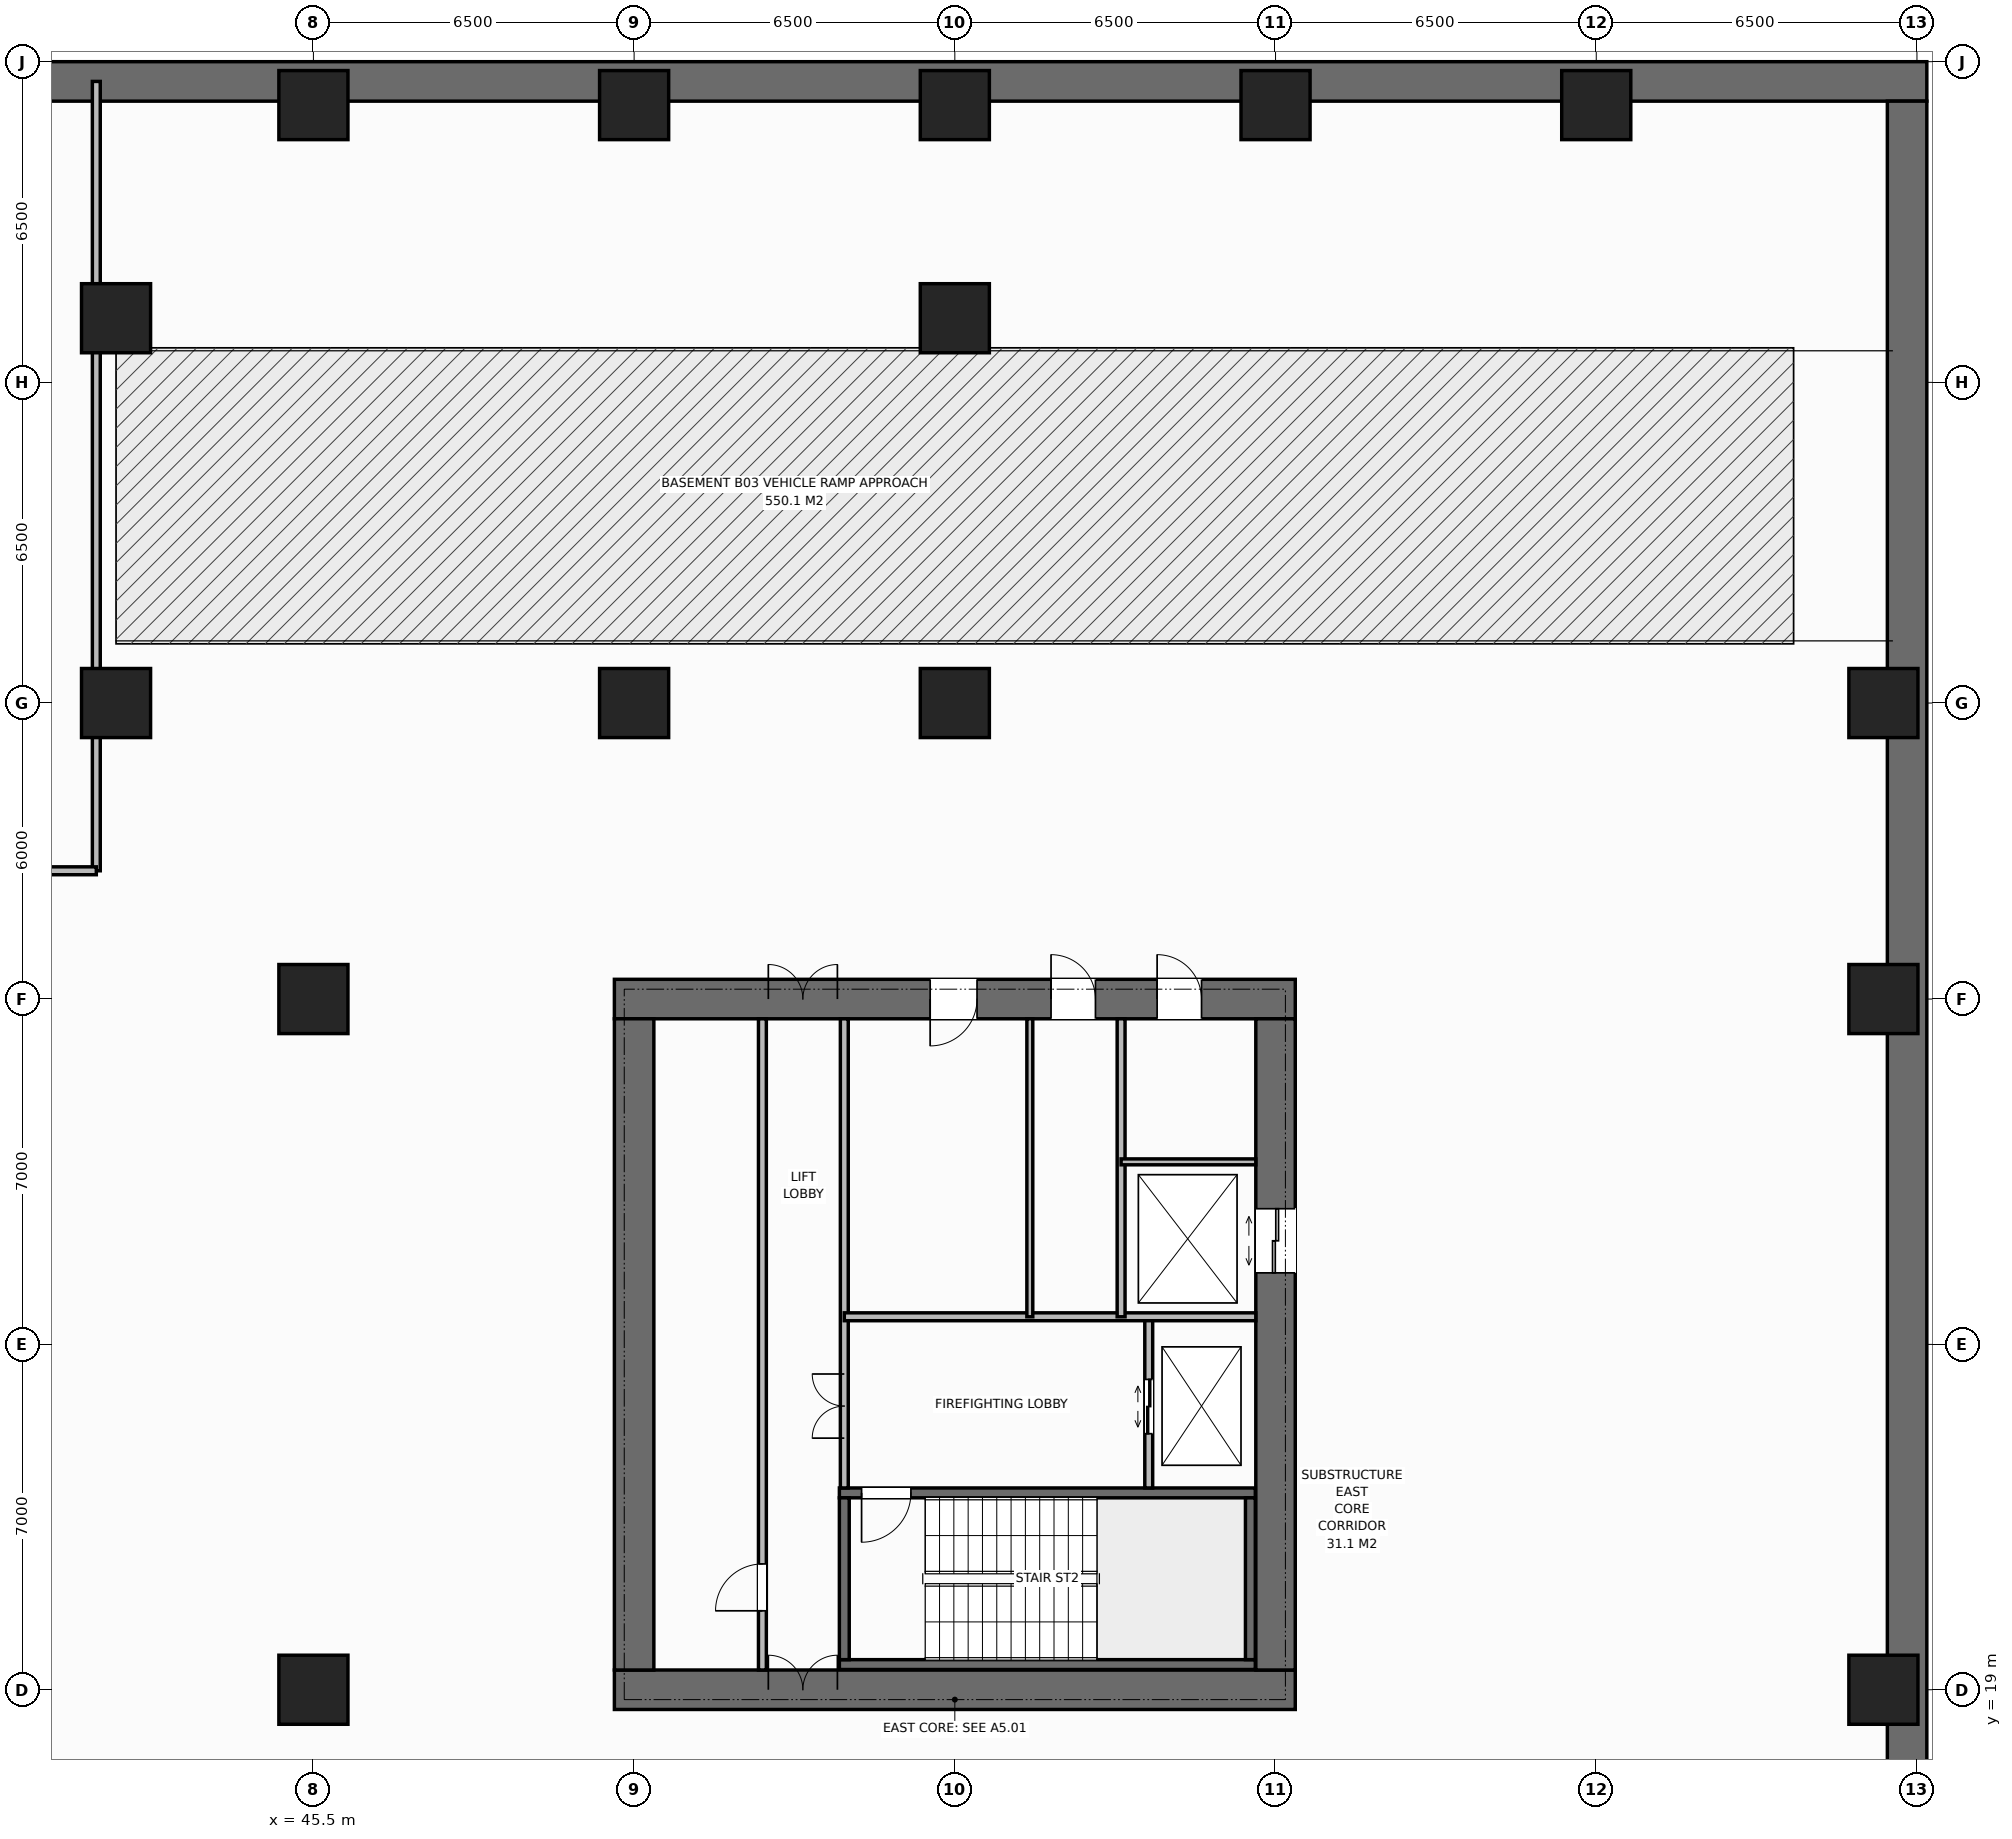
"""IFC4 building model, lengths in metres.
Left out: names, types, materials, properties, quantities, classifications, styles, units other than length and angle.
Written with IfcOpenShell. Run it as: python <this file> out.ifc"""

import sys

from ifc_helpers import new_model, si_unit, direction, frame, frame_2d, origin, origin_2d, place, context, subcontext, project, spatial, rectangle, extrude, element, fill, save


model = new_model("IFC4")
c1 = context("Model", 3, precision=1e-05, world=origin(), true_north=direction((0.0, 1.0)))
c2 = subcontext(c1, "Body", "Model", "MODEL_VIEW")
j1 = project(units=[si_unit("LENGTHUNIT", "METRE"), si_unit("PLANEANGLEUNIT", "RADIAN")], contexts=[c1])
p1 = place(None, origin())
s1 = spatial("IfcSite", under=j1, at=p1, CompositionType="ELEMENT")
p2 = place(p1, origin())
s2 = spatial("IfcBuilding", under=s1, at=p2, CompositionType="ELEMENT")
p3 = place(p2, frame((0.0, 0.0, -13.5)))
s3 = spatial("IfcBuildingStorey", under=s2, at=p3, CompositionType="ELEMENT", Elevation=-13.5)
p4 = place(p3, frame((78.2, 51.6, 0.0), z_axis=(0.0, 0.0, 1.0), x_axis=(-1.0, 0.0, 0.0)))
e1 = element("IfcWall", 1, at=p4, inside=s3, PredefinedType="USERDEFINED", context=c2, shape_type="SweptSolid", body=[
    extrude(rectangle(XDim=78.4, YDim=0.8, at=frame_2d((39.2, 0.0))), origin(), (0.0, 0.0, 1.0), 4.2),
])
p5 = place(p3, frame((77.8, 0.8, 0.0), z_axis=(0.0, 0.0, 1.0), x_axis=(0.0, 1.0, 0.0)))
e2 = element("IfcWall", 2, at=p5, inside=s3, PredefinedType="USERDEFINED", context=c2, shape_type="SweptSolid", body=[
    extrude(rectangle(XDim=50.4, YDim=0.8, at=frame_2d((25.2, 0.0))), origin(), (0.0, 0.0, 1.0), 4.2),
])
p6 = place(p3, frame((51.6, 19.0, 0.0), z_axis=(0.0, 0.0, 1.0), x_axis=(1.0, 0.0, 0.0)))
e3 = element("IfcWall", 3, at=p6, inside=s3, PredefinedType="SHEAR", context=c2, shape_type="SweptSolid", body=[
    extrude(rectangle(XDim=13.8, YDim=0.8, at=frame_2d((6.9, 0.0))), origin(), (0.0, 0.0, 1.0), 4.5),
])
p7 = place(p6, frame((3.12, 0.0, 0.0)))
e4 = element("IfcOpeningElement", 4, at=p7, cuts=e3, PredefinedType="OPENING", context=c2, shape_type="SweptSolid", body=[
    extrude(rectangle(XDim=1.4, YDim=2.2, at=frame_2d((0.7, 1.1))), frame((0.0, 0.41, 0.0), z_axis=(0.0, -1.0, 0.0), x_axis=(1.0, 0.0, 0.0)), (0.0, 0.0, 1.0), 0.82),
])
p8 = place(p3, frame((51.6, 33.0, 0.0), z_axis=(0.0, 0.0, 1.0), x_axis=(1.0, 0.0, 0.0)))
e5 = element("IfcWall", 5, at=p8, inside=s3, PredefinedType="SHEAR", context=c2, shape_type="SweptSolid", body=[
    extrude(rectangle(XDim=13.8, YDim=0.8, at=frame_2d((6.9, 0.0))), origin(), (0.0, 0.0, 1.0), 4.5),
])
p9 = place(p8, frame((3.12, 0.0, 0.0)))
e6 = element("IfcOpeningElement", 6, at=p9, cuts=e5, PredefinedType="OPENING", context=c2, shape_type="SweptSolid", body=[
    extrude(rectangle(XDim=1.4, YDim=2.2, at=frame_2d((0.7, 1.1))), frame((0.0, 0.41, 0.0), z_axis=(0.0, -1.0, 0.0), x_axis=(1.0, 0.0, 0.0)), (0.0, 0.0, 1.0), 0.82),
])
p10 = place(p8, frame((11.0, 0.0, 0.0)))
e7 = element("IfcOpeningElement", 7, at=p10, cuts=e5, PredefinedType="OPENING", context=c2, shape_type="SweptSolid", body=[
    extrude(rectangle(XDim=0.9, YDim=2.15, at=frame_2d((0.45, 1.075))), frame((0.0, 0.41, 0.0), z_axis=(0.0, -1.0, 0.0), x_axis=(1.0, 0.0, 0.0)), (0.0, 0.0, 1.0), 0.82),
])
p11 = place(p8, frame((6.4, 0.0, 0.0)))
e8 = element("IfcOpeningElement", 8, at=p11, cuts=e5, PredefinedType="OPENING", context=c2, shape_type="SweptSolid", body=[
    extrude(rectangle(XDim=0.95, YDim=2.15, at=frame_2d((0.475, 1.075))), frame((0.0, 0.41, 0.0), z_axis=(0.0, -1.0, 0.0), x_axis=(1.0, 0.0, 0.0)), (0.0, 0.0, 1.0), 0.82),
])
p12 = place(p8, frame((8.85, 0.0, 0.0)))
e9 = element("IfcOpeningElement", 9, at=p12, cuts=e5, PredefinedType="OPENING", context=c2, shape_type="SweptSolid", body=[
    extrude(rectangle(XDim=0.9, YDim=2.15, at=frame_2d((0.45, 1.075))), frame((0.0, 0.41, 0.0), z_axis=(0.0, -1.0, 0.0), x_axis=(1.0, 0.0, 0.0)), (0.0, 0.0, 1.0), 0.82),
])
p13 = place(p3, frame((52.0, 19.4, 0.0), z_axis=(0.0, 0.0, 1.0), x_axis=(0.0, 1.0, 0.0)))
e10 = element("IfcWall", 10, at=p13, inside=s3, PredefinedType="SHEAR", context=c2, shape_type="SweptSolid", body=[
    extrude(rectangle(XDim=13.2, YDim=0.8, at=frame_2d((6.6, 0.0))), origin(), (0.0, 0.0, 1.0), 4.5),
])
p14 = place(p3, frame((65.0, 19.4, 0.0), z_axis=(0.0, 0.0, 1.0), x_axis=(0.0, 1.0, 0.0)))
e11 = element("IfcWall", 11, at=p14, inside=s3, PredefinedType="SHEAR", context=c2, shape_type="SweptSolid", body=[
    extrude(rectangle(XDim=13.2, YDim=0.8, at=frame_2d((6.6, 0.0))), origin(), (0.0, 0.0, 1.0), 4.5),
])
p15 = place(p14, frame((8.05, 0.0, 0.0)))
e12 = element("IfcOpeningElement", 12, at=p15, cuts=e11, PredefinedType="OPENING", context=c2, shape_type="SweptSolid", body=[
    extrude(rectangle(XDim=1.3, YDim=2.2, at=frame_2d((0.65, 1.1))), frame((0.0, 0.41, 0.0), z_axis=(0.0, -1.0, 0.0), x_axis=(1.0, 0.0, 0.0)), (0.0, 0.0, 1.0), 0.82),
])
p16 = place(p3, frame((56.16, 19.51, 0.0), z_axis=(0.0, 0.0, 1.0), x_axis=(1.0, 0.0, 0.0)))
e13 = element("IfcWall", 13, at=p16, inside=s3, PredefinedType="SHEAR", context=c2, shape_type="SweptSolid", body=[
    extrude(rectangle(XDim=8.43, YDim=0.2, at=frame_2d((4.215, 0.0))), origin(), (0.0, 0.0, 1.0), 4.5),
])
p17 = place(p3, frame((56.16, 22.99, 0.0), z_axis=(0.0, 0.0, 1.0), x_axis=(1.0, 0.0, 0.0)))
e14 = element("IfcWall", 14, at=p17, inside=s3, PredefinedType="SHEAR", context=c2, shape_type="SweptSolid", body=[
    extrude(rectangle(XDim=8.43, YDim=0.2, at=frame_2d((4.215, 0.0))), origin(), (0.0, 0.0, 1.0), 4.5),
])
p18 = place(p17, frame((0.45, 0.0, 0.0)))
e15 = element("IfcOpeningElement", 15, at=p18, cuts=e14, PredefinedType="OPENING", context=c2, shape_type="SweptSolid", body=[
    extrude(rectangle(XDim=1.0, YDim=2.15, at=frame_2d((0.5, 1.075))), frame((0.0, 0.11, 0.0), z_axis=(0.0, -1.0, 0.0), x_axis=(1.0, 0.0, 0.0)), (0.0, 0.0, 1.0), 0.22),
])
for number, where, z_axis, x_axis in (
    (16, (56.26, 19.61, 0.0), (0.0, 0.0, 1.0), (0.0, 1.0, 0.0)),
    (17, (64.49, 19.61, 0.0), (0.0, 0.0, 1.0), (0.0, 1.0, 0.0)),
):
    element("IfcWall", number, at=place(p3, frame(where, z_axis=z_axis, x_axis=x_axis)), inside=s3, PredefinedType="SHEAR", context=c2, shape_type="SweptSolid", body=[
        extrude(rectangle(XDim=3.28, YDim=0.2, at=frame_2d((1.64, 0.0))), origin(), (0.0, 0.0, 1.0), 4.5),
    ])
for number, where, z_axis, x_axis in (
    (18, (58.5, 39.0, 0.0), (0.0, 0.0, 1.0), (1.0, 0.0, 0.0)),
    (19, (45.5, 19.0, 0.0), (0.0, 0.0, 1.0), (1.0, 0.0, 0.0)),
    (20, (45.5, 33.0, 0.0), (0.0, 0.0, 1.0), (1.0, 0.0, 0.0)),
    (21, (41.5, 39.0, 0.0), (0.0, 0.0, 1.0), (1.0, 0.0, 0.0)),
    (22, (41.5, 46.8, 0.0), (0.0, 0.0, 1.0), (1.0, 0.0, 0.0)),
    (23, (58.5, 46.8, 0.0), (0.0, 0.0, 1.0), (1.0, 0.0, 0.0)),
    (24, (52.0, 39.0, 0.0), (0.0, 0.0, 1.0), (1.0, 0.0, 0.0)),
    (25, (45.5, 51.12, 0.0), (0.0, 0.0, 1.0), (1.0, 0.0, 0.0)),
    (26, (52.0, 51.12, 0.0), (0.0, 0.0, 1.0), (1.0, 0.0, 0.0)),
    (27, (58.5, 51.12, 0.0), (0.0, 0.0, 1.0), (1.0, 0.0, 0.0)),
    (28, (65.0, 51.12, 0.0), (0.0, 0.0, 1.0), (1.0, 0.0, 0.0)),
    (29, (71.5, 51.12, 0.0), (0.0, 0.0, 1.0), (1.0, 0.0, 0.0)),
    (30, (77.32, 19.0, 0.0), (0.0, 0.0, 1.0), (1.0, 0.0, 0.0)),
    (31, (77.32, 33.0, 0.0), (0.0, 0.0, 1.0), (1.0, 0.0, 0.0)),
    (32, (77.32, 39.0, 0.0), (0.0, 0.0, 1.0), (1.0, 0.0, 0.0)),
):
    element("IfcColumn", number, at=place(p3, frame(where, z_axis=z_axis, x_axis=x_axis)), inside=s3, PredefinedType="COLUMN", context=c2, shape_type="SweptSolid", body=[
        extrude(rectangle(XDim=1.4, YDim=1.4, at=origin_2d()), origin(), (0.0, 0.0, 1.0), 4.5),
    ])
p19 = place(p3, frame((54.6, 19.4, 0.0), z_axis=(0.0, 0.0, 1.0), x_axis=(0.0, 1.0, 0.0)))
e33 = element("IfcWall", 33, at=p19, inside=s3, PredefinedType="STANDARD", context=c2, shape_type="SweptSolid", body=[
    extrude(rectangle(XDim=13.2, YDim=0.16, at=frame_2d((6.6, 0.0))), origin(), (0.0, 0.0, 1.0), 4.2),
])
p20 = place(p19, frame((1.2, 0.0, 0.0)))
e34 = element("IfcOpeningElement", 34, at=p20, cuts=e33, PredefinedType="OPENING", context=c2, shape_type="SweptSolid", body=[
    extrude(rectangle(XDim=0.95, YDim=2.15, at=frame_2d((0.475, 1.075))), frame((0.0, 0.09, 0.0), z_axis=(0.0, -1.0, 0.0), x_axis=(1.0, 0.0, 0.0)), (0.0, 0.0, 1.0), 0.18),
])
p21 = place(p3, frame((56.26, 23.09, 0.0), z_axis=(0.0, 0.0, 1.0), x_axis=(0.0, 1.0, 0.0)))
e35 = element("IfcWall", 35, at=p21, inside=s3, PredefinedType="STANDARD", context=c2, shape_type="SweptSolid", body=[
    extrude(rectangle(XDim=9.51, YDim=0.16, at=frame_2d((4.755, 0.0))), origin(), (0.0, 0.0, 1.0), 4.2),
])
p22 = place(p21, frame((1.01, 0.0, 0.0)))
e36 = element("IfcOpeningElement", 36, at=p22, cuts=e35, PredefinedType="OPENING", context=c2, shape_type="SweptSolid", body=[
    extrude(rectangle(XDim=1.3, YDim=2.2, at=frame_2d((0.65, 1.1))), frame((0.0, 0.09, 0.0), z_axis=(0.0, -1.0, 0.0), x_axis=(1.0, 0.0, 0.0)), (0.0, 0.0, 1.0), 0.18),
])
p23 = place(p3, frame((62.43, 23.09, 0.0), z_axis=(0.0, 0.0, 1.0), x_axis=(0.0, 1.0, 0.0)))
e37 = element("IfcWall", 37, at=p23, inside=s3, PredefinedType="STANDARD", context=c2, shape_type="SweptSolid", body=[
    extrude(rectangle(XDim=3.47, YDim=0.16, at=frame_2d((1.735, 0.0))), origin(), (0.0, 0.0, 1.0), 4.2),
])
p24 = place(p23, frame((1.1, 0.0, 0.0)))
e38 = element("IfcOpeningElement", 38, at=p24, cuts=e37, PredefinedType="OPENING", context=c2, shape_type="SweptSolid", body=[
    extrude(rectangle(XDim=1.1, YDim=2.2, at=frame_2d((0.55, 1.1))), frame((0.0, 0.09, 0.0), z_axis=(0.0, -1.0, 0.0), x_axis=(1.0, 0.0, 0.0)), (0.0, 0.0, 1.0), 0.18),
])
p25 = place(p3, frame((56.26, 26.56, 0.0), z_axis=(0.0, 0.0, 1.0), x_axis=(1.0, 0.0, 0.0)))
e39 = element("IfcWall", 39, at=p25, inside=s3, PredefinedType="STANDARD", context=c2, shape_type="SweptSolid", body=[
    extrude(rectangle(XDim=8.34, YDim=0.16, at=frame_2d((4.17, 0.0))), origin(), (0.0, 0.0, 1.0), 4.2),
])
p26 = place(p3, frame((61.87, 26.56, 0.0), z_axis=(0.0, 0.0, 1.0), x_axis=(0.0, 1.0, 0.0)))
e40 = element("IfcWall", 40, at=p26, inside=s3, PredefinedType="STANDARD", context=c2, shape_type="SweptSolid", body=[
    extrude(rectangle(XDim=6.04, YDim=0.16, at=frame_2d((3.02, 0.0))), origin(), (0.0, 0.0, 1.0), 4.2),
])
p27 = place(p3, frame((61.87, 29.7, 0.0), z_axis=(0.0, 0.0, 1.0), x_axis=(1.0, 0.0, 0.0)))
e41 = element("IfcWall", 41, at=p27, inside=s3, PredefinedType="PARTITIONING", context=c2, shape_type="SweptSolid", body=[
    extrude(rectangle(XDim=2.73, YDim=0.12, at=frame_2d((1.365, 0.0))), origin(), (0.0, 0.0, 1.0), 4.2),
])
p28 = place(p3, frame((60.02, 26.56, 0.0), z_axis=(0.0, 0.0, 1.0), x_axis=(0.0, 1.0, 0.0)))
e42 = element("IfcWall", 42, at=p28, inside=s3, PredefinedType="PARTITIONING", context=c2, shape_type="SweptSolid", body=[
    extrude(rectangle(XDim=6.04, YDim=0.12, at=frame_2d((3.02, 0.0))), origin(), (0.0, 0.0, 1.0), 4.2),
])
p29 = place(p3, frame((41.1, 35.6, 0.0), z_axis=(0.0, 0.0, 1.0), x_axis=(0.0, 1.0, 0.0)))
e43 = element("IfcWall", 43, at=p29, inside=s3, PredefinedType="STANDARD", context=c2, shape_type="SweptSolid", body=[
    extrude(rectangle(XDim=16.0, YDim=0.16, at=frame_2d((8.0, 0.0))), origin(), (0.0, 0.0, 1.0), 4.2),
])
p30 = place(p3, frame((0.4, 35.6, 0.0), z_axis=(0.0, 0.0, 1.0), x_axis=(1.0, 0.0, 0.0)))
e44 = element("IfcWall", 44, at=p30, inside=s3, PredefinedType="STANDARD", context=c2, shape_type="SweptSolid", body=[
    extrude(rectangle(XDim=40.7, YDim=0.16, at=frame_2d((20.35, 0.0))), origin(), (0.0, 0.0, 1.0), 4.2),
])
p31 = place(p30, frame((16.0, 0.0, 0.0)))
e45 = element("IfcOpeningElement", 45, at=p31, cuts=e44, PredefinedType="OPENING", context=c2, shape_type="SweptSolid", body=[
    extrude(rectangle(XDim=1.4, YDim=2.2, at=frame_2d((0.7, 1.1))), frame((0.0, 0.09, 0.0), z_axis=(0.0, -1.0, 0.0), x_axis=(1.0, 0.0, 0.0)), (0.0, 0.0, 1.0), 0.18),
])
p32 = place(p7, origin())
e46 = element("IfcDoor", 46, at=p32, inside=s3, OperationType="DOUBLE_DOOR_SINGLE_SWING", PredefinedType="DOOR", context=c2, shape_type="SweptSolid", body=[
    extrude(rectangle(XDim=1.4, YDim=2.2, at=frame_2d((0.7, 1.1))), frame((0.0, 0.125, 0.0), z_axis=(0.0, -1.0, 0.0), x_axis=(1.0, 0.0, 0.0)), (0.0, 0.0, 1.0), 0.05),
])
fill(e4, e46)
p33 = place(p9, origin())
e47 = element("IfcDoor", 47, at=p33, inside=s3, OperationType="DOUBLE_DOOR_SINGLE_SWING", PredefinedType="DOOR", context=c2, shape_type="SweptSolid", body=[
    extrude(rectangle(XDim=1.4, YDim=2.2, at=frame_2d((0.7, 1.1))), frame((0.0, -0.075, 0.0), z_axis=(0.0, -1.0, 0.0), x_axis=(1.0, 0.0, 0.0)), (0.0, 0.0, 1.0), 0.05),
])
fill(e6, e47)
p34 = place(p20, origin())
e48 = element("IfcDoor", 48, at=p34, inside=s3, OperationType="SINGLE_SWING_LEFT", PredefinedType="DOOR", context=c2, shape_type="SweptSolid", body=[
    extrude(rectangle(XDim=0.95, YDim=2.15, at=frame_2d((0.475, 1.075))), frame((0.0, 0.025, 0.0), z_axis=(0.0, -1.0, 0.0), x_axis=(1.0, 0.0, 0.0)), (0.0, 0.0, 1.0), 0.05),
])
fill(e34, e48)
p35 = place(p18, origin())
e49 = element("IfcDoor", 49, at=p35, inside=s3, OperationType="SINGLE_SWING_RIGHT", PredefinedType="DOOR", context=c2, shape_type="SweptSolid", body=[
    extrude(rectangle(XDim=1.0, YDim=2.15, at=frame_2d((0.5, 1.075))), frame((0.0, 0.025, 0.0), z_axis=(0.0, -1.0, 0.0), x_axis=(1.0, 0.0, 0.0)), (0.0, 0.0, 1.0), 0.05),
])
fill(e15, e49)
p36 = place(p24, origin())
e50 = element("IfcDoor", 50, at=p36, inside=s3, OperationType="DOUBLE_DOOR_SLIDING", PredefinedType="DOOR", context=c2, shape_type="SweptSolid", body=[
    extrude(rectangle(XDim=1.1, YDim=2.2, at=frame_2d((0.55, 1.1))), frame((0.0, 0.025, 0.0), z_axis=(0.0, -1.0, 0.0), x_axis=(1.0, 0.0, 0.0)), (0.0, 0.0, 1.0), 0.05),
])
fill(e38, e50)
p37 = place(p22, origin())
e51 = element("IfcDoor", 51, at=p37, inside=s3, OperationType="DOUBLE_DOOR_SINGLE_SWING", PredefinedType="DOOR", context=c2, shape_type="SweptSolid", body=[
    extrude(rectangle(XDim=1.3, YDim=2.2, at=frame_2d((0.65, 1.1))), frame((0.0, 0.025, 0.0), z_axis=(0.0, -1.0, 0.0), x_axis=(1.0, 0.0, 0.0)), (0.0, 0.0, 1.0), 0.05),
])
fill(e36, e51)
p38 = place(p15, origin())
e52 = element("IfcDoor", 52, at=p38, inside=s3, OperationType="DOUBLE_DOOR_SLIDING", PredefinedType="DOOR", context=c2, shape_type="SweptSolid", body=[
    extrude(rectangle(XDim=1.3, YDim=2.2, at=frame_2d((0.65, 1.1))), frame((0.0, 0.025, 0.0), z_axis=(0.0, -1.0, 0.0), x_axis=(1.0, 0.0, 0.0)), (0.0, 0.0, 1.0), 0.05),
])
fill(e12, e52)
p39 = place(p10, origin())
e53 = element("IfcDoor", 53, at=p39, inside=s3, OperationType="SINGLE_SWING_LEFT", PredefinedType="DOOR", context=c2, shape_type="SweptSolid", body=[
    extrude(rectangle(XDim=0.9, YDim=2.15, at=frame_2d((0.45, 1.075))), frame((0.0, -0.075, 0.0), z_axis=(0.0, -1.0, 0.0), x_axis=(1.0, 0.0, 0.0)), (0.0, 0.0, 1.0), 0.05),
])
fill(e7, e53)
p40 = place(p11, origin())
e54 = element("IfcDoor", 54, at=p40, inside=s3, OperationType="SINGLE_SWING_RIGHT", PredefinedType="DOOR", context=c2, shape_type="SweptSolid", body=[
    extrude(rectangle(XDim=0.95, YDim=2.15, at=frame_2d((0.475, 1.075))), frame((0.0, -0.075, 0.0), z_axis=(0.0, -1.0, 0.0), x_axis=(1.0, 0.0, 0.0)), (0.0, 0.0, 1.0), 0.05),
])
fill(e8, e54)
p41 = place(p12, origin())
e55 = element("IfcDoor", 55, at=p41, inside=s3, OperationType="SINGLE_SWING_LEFT", PredefinedType="DOOR", context=c2, shape_type="SweptSolid", body=[
    extrude(rectangle(XDim=0.9, YDim=2.15, at=frame_2d((0.45, 1.075))), frame((0.0, -0.075, 0.0), z_axis=(0.0, -1.0, 0.0), x_axis=(1.0, 0.0, 0.0)), (0.0, 0.0, 1.0), 0.05),
])
fill(e9, e55)
save(model, sys.argv[1])
